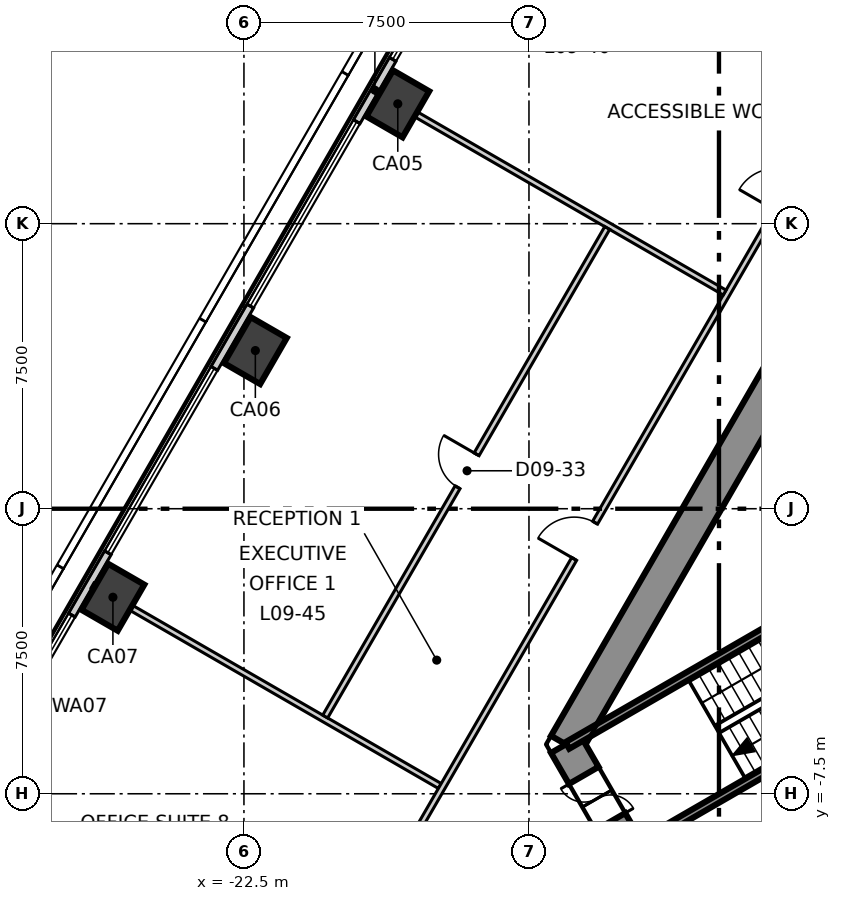
"""IFC4 building model, lengths in metres.
Left out: names, types, materials, properties, quantities, classifications, styles, units other than length and angle.
Written with IfcOpenShell. Run it as: python <this file> out.ifc"""

import sys

from ifc_helpers import new_model, si_unit, direction, frame, frame_2d, origin, origin_2d, place, context, subcontext, project, spatial, polyline, rectangle, outline, extrude, element, fill, save


model = new_model("IFC4")
c1 = context("Model", 3, precision=1e-05, world=origin(), true_north=direction((0.0, 1.0)))
c2 = subcontext(c1, "Body", "Model", "MODEL_VIEW")
j1 = project(units=[si_unit("LENGTHUNIT", "METRE"), si_unit("PLANEANGLEUNIT", "RADIAN")], contexts=[c1])
p1 = place(None, origin())
s1 = spatial("IfcSite", under=j1, at=p1, CompositionType="ELEMENT")
p2 = place(p1, origin())
s2 = spatial("IfcBuilding", under=s1, at=p2, CompositionType="ELEMENT")
p3 = place(p2, frame((0.0, 0.0, 47.3)))
s3 = spatial("IfcBuildingStorey", under=s2, at=p3, CompositionType="ELEMENT", Elevation=47.3)
p4 = place(p3, frame((-1.645, 15.25, -0.3), z_axis=(0.0, 0.0, 1.0), x_axis=(-0.500026485275, -0.866010111964, 0.0)))
e1 = element("IfcWall", 1, at=p4, inside=s3, PredefinedType="SHEAR", context=c2, shape_type="SweptSolid", body=[
    extrude(outline(polyline([(-0.26, -0.45), (1.685, -0.45), (3.63, -0.45), (5.576, -0.45), (7.521, -0.45), (9.466, -0.449), (11.411, -0.449), (13.357, -0.449), (15.302, -0.449), (17.247, -0.449), (19.192, -0.449), (21.138, -0.449), (23.083, -0.449), (25.028, -0.449), (24.509, 0.45), (22.644, 0.45), (20.778, 0.45), (18.913, 0.45), (17.048, 0.45), (15.182, 0.449), (13.317, 0.449), (11.452, 0.449), (9.587, 0.449), (7.721, 0.449), (5.856, 0.449), (3.991, 0.449), (2.125, 0.449), (0.26, 0.449), (-0.26, -0.45)])), origin(), (0.0, 0.0, 1.0), 4.0),
])
p5 = place(p4, frame((11.834, 0.0, 0.3)))
e2 = element("IfcOpeningElement", 2, at=p5, cuts=e1, PredefinedType="OPENING", context=c2, shape_type="SweptSolid", body=[
    extrude(rectangle(XDim=1.1, YDim=2.1, at=frame_2d((0.55, 1.05))), frame((0.0, 0.46, 0.0), z_axis=(0.0, -1.0, 0.0), x_axis=(1.0, 0.0, 0.0)), (0.0, 0.0, 1.0), 0.92),
])
p6 = place(p4, frame((6.671, 0.0, 0.3)))
e3 = element("IfcOpeningElement", 3, at=p6, cuts=e1, PredefinedType="OPENING", context=c2, shape_type="SweptSolid", body=[
    extrude(rectangle(XDim=1.0, YDim=2.1, at=frame_2d((0.5, 1.05))), frame((0.0, 0.46, 0.0), z_axis=(0.0, -1.0, 0.0), x_axis=(1.0, 0.0, 0.0)), (0.0, 0.0, 1.0), 0.92),
])
p7 = place(p3, frame((-14.03, -6.2, -0.3), z_axis=(0.0, 0.0, 1.0), x_axis=(0.500111984565, -0.865960739811, 0.0)))
e4 = element("IfcWall", 4, at=p7, inside=s3, PredefinedType="SHEAR", context=c2, shape_type="SweptSolid", body=[
    extrude(outline(polyline([(-0.26, -0.449), (1.646, -0.449), (3.551, -0.45), (3.032, 0.45), (1.646, 0.45), (0.26, 0.45), (-0.26, -0.449)])), origin(), (0.0, 0.0, 1.0), 4.0),
])
p8 = place(p7, frame((0.946, 0.0, 0.3)))
e5 = element("IfcOpeningElement", 5, at=p8, cuts=e4, PredefinedType="OPENING", context=c2, shape_type="SweptSolid", body=[
    extrude(rectangle(XDim=1.4, YDim=2.1, at=frame_2d((0.7, 1.05))), frame((0.0, 0.46, 0.0), z_axis=(0.0, -1.0, 0.0), x_axis=(1.0, 0.0, 0.0)), (0.0, 0.0, 1.0), 0.92),
])
for number, where, z_axis, x_axis in (
    (6, (-18.452, 10.654, -0.3), (0.0, 0.0, 1.0), (0.5, 0.866, 0.0)),
    (7, (-22.2, 4.162, -0.3), (0.0, 0.0, 1.0), (0.5, 0.866, 0.0)),
    (8, (-25.948, -2.329, -0.3), (0.0, 0.0, 1.0), (0.5, 0.866, 0.0)),
):
    element("IfcColumn", number, at=place(p3, frame(where, z_axis=z_axis, x_axis=x_axis)), inside=s3, PredefinedType="COLUMN", context=c2, shape_type="SweptSolid", body=[
        extrude(rectangle(XDim=1.4, YDim=1.1, at=origin_2d()), origin(), (0.0, 0.0, 1.0), 4.0),
    ])
p9 = place(p3, frame((-3.417, 38.096, 0.0), z_axis=(0.0, 0.0, 1.0), x_axis=(-0.500000412988, -0.866025165346, 0.0)))
e9 = element("IfcWall", 9, at=p9, inside=s3, PredefinedType="ELEMENTEDWALL", context=c2, shape_type="SweptSolid", body=[
    extrude(rectangle(XDim=62.548, YDim=0.2, at=frame_2d((31.274, 0.0))), origin(), (0.0, 0.0, 1.0), 3.7),
])
p10 = place(p9, frame((2.25, 0.0, 0.9)))
e10 = element("IfcOpeningElement", 10, at=p10, cuts=e9, PredefinedType="OPENING", context=c2, shape_type="SweptSolid", body=[
    extrude(rectangle(XDim=5.6, YDim=2.5, at=frame_2d((2.8, 1.25))), frame((0.0, 0.11, 0.0), z_axis=(0.0, -1.0, 0.0), x_axis=(1.0, 0.0, 0.0)), (0.0, 0.0, 1.0), 0.22),
])
p11 = place(p9, frame((9.745, 0.0, 0.9)))
e11 = element("IfcOpeningElement", 11, at=p11, cuts=e9, PredefinedType="OPENING", context=c2, shape_type="SweptSolid", body=[
    extrude(rectangle(XDim=5.6, YDim=2.5, at=frame_2d((2.8, 1.25))), frame((0.0, 0.11, 0.0), z_axis=(0.0, -1.0, 0.0), x_axis=(1.0, 0.0, 0.0)), (0.0, 0.0, 1.0), 0.22),
])
p12 = place(p9, frame((17.241, 0.0, 0.9)))
e12 = element("IfcOpeningElement", 12, at=p12, cuts=e9, PredefinedType="OPENING", context=c2, shape_type="SweptSolid", body=[
    extrude(rectangle(XDim=5.6, YDim=2.5, at=frame_2d((2.8, 1.25))), frame((0.0, 0.11, 0.0), z_axis=(0.0, -1.0, 0.0), x_axis=(1.0, 0.0, 0.0)), (0.0, 0.0, 1.0), 0.22),
])
p13 = place(p9, frame((24.736, 0.0, 0.9)))
e13 = element("IfcOpeningElement", 13, at=p13, cuts=e9, PredefinedType="OPENING", context=c2, shape_type="SweptSolid", body=[
    extrude(rectangle(XDim=5.6, YDim=2.5, at=frame_2d((2.8, 1.25))), frame((0.0, 0.11, 0.0), z_axis=(0.0, -1.0, 0.0), x_axis=(1.0, 0.0, 0.0)), (0.0, 0.0, 1.0), 0.22),
])
p14 = place(p9, frame((32.231, 0.0, 0.9)))
e14 = element("IfcOpeningElement", 14, at=p14, cuts=e9, PredefinedType="OPENING", context=c2, shape_type="SweptSolid", body=[
    extrude(rectangle(XDim=5.6, YDim=2.5, at=frame_2d((2.8, 1.25))), frame((0.0, 0.11, 0.0), z_axis=(0.0, -1.0, 0.0), x_axis=(1.0, 0.0, 0.0)), (0.0, 0.0, 1.0), 0.22),
])
p15 = place(p9, frame((39.727, 0.0, 0.9)))
e15 = element("IfcOpeningElement", 15, at=p15, cuts=e9, PredefinedType="OPENING", context=c2, shape_type="SweptSolid", body=[
    extrude(rectangle(XDim=5.6, YDim=2.5, at=frame_2d((2.8, 1.25))), frame((0.0, 0.11, 0.0), z_axis=(0.0, -1.0, 0.0), x_axis=(1.0, 0.0, 0.0)), (0.0, 0.0, 1.0), 0.22),
])
p16 = place(p9, frame((47.222, 0.0, 0.9)))
e16 = element("IfcOpeningElement", 16, at=p16, cuts=e9, PredefinedType="OPENING", context=c2, shape_type="SweptSolid", body=[
    extrude(rectangle(XDim=5.6, YDim=2.5, at=frame_2d((2.8, 1.25))), frame((0.0, 0.11, 0.0), z_axis=(0.0, -1.0, 0.0), x_axis=(1.0, 0.0, 0.0)), (0.0, 0.0, 1.0), 0.22),
])
p17 = place(p9, frame((54.717, 0.0, 0.9)))
e17 = element("IfcOpeningElement", 17, at=p17, cuts=e9, PredefinedType="OPENING", context=c2, shape_type="SweptSolid", body=[
    extrude(rectangle(XDim=5.6, YDim=2.5, at=frame_2d((2.8, 1.25))), frame((0.0, 0.11, 0.0), z_axis=(0.0, -1.0, 0.0), x_axis=(1.0, 0.0, 0.0)), (0.0, 0.0, 1.0), 0.22),
])
p18 = place(p3, frame((-26.485, -2.019, 0.0), z_axis=(0.0, 0.0, 1.0), x_axis=(0.866027613664, -0.499996172356, 0.0)))
e18 = element("IfcWall", 18, at=p18, inside=s3, PredefinedType="PARTITIONING", context=c2, shape_type="SweptSolid", body=[
    extrude(rectangle(XDim=10.552, YDim=0.15, at=frame_2d((5.276, 0.0))), origin(), (0.0, 0.0, 1.0), 3.7),
])
p19 = place(p3, frame((-19.497, -11.17, 0.0), z_axis=(0.0, 0.0, 1.0), x_axis=(0.499998854553, 0.866026065108, 0.0)))
e19 = element("IfcWall", 19, at=p19, inside=s3, PredefinedType="PARTITIONING", context=c2, shape_type="SweptSolid", body=[
    extrude(rectangle(XDim=38.994, YDim=0.15, at=frame_2d((19.497, 0.0))), origin(), (0.0, 0.0, 1.0), 3.7),
])
p20 = place(p19, frame((36.144, 0.0, 0.0)))
e20 = element("IfcOpeningElement", 20, at=p20, cuts=e19, PredefinedType="OPENING", context=c2, shape_type="SweptSolid", body=[
    extrude(rectangle(XDim=1.1, YDim=2.1, at=frame_2d((0.55, 1.05))), frame((0.0, 0.085, 0.0), z_axis=(0.0, -1.0, 0.0), x_axis=(1.0, 0.0, 0.0)), (0.0, 0.0, 1.0), 0.17),
])
p21 = place(p19, frame((21.963, 0.0, 0.0)))
e21 = element("IfcOpeningElement", 21, at=p21, cuts=e19, PredefinedType="OPENING", context=c2, shape_type="SweptSolid", body=[
    extrude(rectangle(XDim=1.1, YDim=2.1, at=frame_2d((0.55, 1.05))), frame((0.0, 0.085, 0.0), z_axis=(0.0, -1.0, 0.0), x_axis=(1.0, 0.0, 0.0)), (0.0, 0.0, 1.0), 0.17),
])
p22 = place(p19, frame((32.363, 0.0, 0.0)))
e22 = element("IfcOpeningElement", 22, at=p22, cuts=e19, PredefinedType="OPENING", context=c2, shape_type="SweptSolid", body=[
    extrude(rectangle(XDim=0.9, YDim=2.1, at=frame_2d((0.45, 1.05))), frame((0.0, 0.085, 0.0), z_axis=(0.0, -1.0, 0.0), x_axis=(1.0, 0.0, 0.0)), (0.0, 0.0, 1.0), 0.17),
])
p23 = place(p19, frame((29.163, 0.0, 0.0)))
e23 = element("IfcOpeningElement", 23, at=p23, cuts=e19, PredefinedType="OPENING", context=c2, shape_type="SweptSolid", body=[
    extrude(rectangle(XDim=0.9, YDim=2.1, at=frame_2d((0.45, 1.05))), frame((0.0, 0.085, 0.0), z_axis=(0.0, -1.0, 0.0), x_axis=(1.0, 0.0, 0.0)), (0.0, 0.0, 1.0), 0.17),
])
p24 = place(p19, frame((26.263, 0.0, 0.0)))
e24 = element("IfcOpeningElement", 24, at=p24, cuts=e19, PredefinedType="OPENING", context=c2, shape_type="SweptSolid", body=[
    extrude(rectangle(XDim=1.0, YDim=2.1, at=frame_2d((0.5, 1.05))), frame((0.0, 0.085, 0.0), z_axis=(0.0, -1.0, 0.0), x_axis=(1.0, 0.0, 0.0)), (0.0, 0.0, 1.0), 0.17),
])
p25 = place(p19, frame((11.373, 0.0, 0.0)))
e25 = element("IfcOpeningElement", 25, at=p25, cuts=e19, PredefinedType="OPENING", context=c2, shape_type="SweptSolid", body=[
    extrude(rectangle(XDim=1.1, YDim=2.1, at=frame_2d((0.55, 1.05))), frame((0.0, 0.085, 0.0), z_axis=(0.0, -1.0, 0.0), x_axis=(1.0, 0.0, 0.0)), (0.0, 0.0, 1.0), 0.17),
])
p26 = place(p19, frame((1.581, 0.0, 0.0)))
e26 = element("IfcOpeningElement", 26, at=p26, cuts=e19, PredefinedType="OPENING", context=c2, shape_type="SweptSolid", body=[
    extrude(rectangle(XDim=1.1, YDim=2.1, at=frame_2d((0.55, 1.05))), frame((0.0, 0.085, 0.0), z_axis=(0.0, -1.0, 0.0), x_axis=(1.0, 0.0, 0.0)), (0.0, 0.0, 1.0), 0.17),
])
p27 = place(p3, frame((-18.989, 10.964, 0.0), z_axis=(0.0, 0.0, 1.0), x_axis=(0.866011810196, -0.500023544047, 0.0)))
e27 = element("IfcWall", 27, at=p27, inside=s3, PredefinedType="PARTITIONING", context=c2, shape_type="SweptSolid", body=[
    extrude(rectangle(XDim=10.552, YDim=0.15, at=frame_2d((5.276, 0.0))), origin(), (0.0, 0.0, 1.0), 3.2),
])
p28 = place(p3, frame((-9.743, 12.774, 0.0), z_axis=(0.0, 0.0, 1.0), x_axis=(0.865973391227, -0.500090077572, 0.0)))
e28 = element("IfcWall", 28, at=p28, inside=s3, PredefinedType="PARTITIONING", context=c2, shape_type="SweptSolid", body=[
    extrude(rectangle(XDim=3.449, YDim=0.15, at=frame_2d((1.725, 0.0))), origin(), (0.0, 0.0, 1.0), 3.7),
])
p29 = place(p3, frame((-20.362, -5.468, 0.0), z_axis=(0.0, 0.0, 1.0), x_axis=(0.49999393442, 0.866028905721, 0.0)))
e29 = element("IfcWall", 29, at=p29, inside=s3, PredefinedType="PARTITIONING", context=c2, shape_type="SweptSolid", body=[
    extrude(rectangle(XDim=14.843, YDim=0.15, at=frame_2d((7.421, 0.0))), origin(), (0.0, 0.0, 1.0), 3.7),
])
p30 = place(p29, frame((6.967, 0.0, 0.0)))
e30 = element("IfcOpeningElement", 30, at=p30, cuts=e29, PredefinedType="OPENING", context=c2, shape_type="SweptSolid", body=[
    extrude(rectangle(XDim=1.0, YDim=2.1, at=frame_2d((0.5, 1.05))), frame((0.0, 0.085, 0.0), z_axis=(0.0, -1.0, 0.0), x_axis=(1.0, 0.0, 0.0)), (0.0, 0.0, 1.0), 0.17),
])
p31 = place(p3, frame((-13.99, -6.229, 0.0), z_axis=(0.0, 0.0, 1.0), x_axis=(0.866060059011, 0.499939970583, 0.0)))
e31 = element("IfcWall", 31, at=p31, inside=s3, PredefinedType="SOLIDWALL", context=c2, shape_type="SweptSolid", body=[
    extrude(rectangle(XDim=8.615, YDim=0.2, at=frame_2d((4.307, 0.0))), origin(), (0.0, 0.0, 1.0), 3.7),
])
p32 = place(p3, frame((-12.39, -9.001, 0.0), z_axis=(0.0, 0.0, 1.0), x_axis=(0.866010975815, 0.500024989144, 0.0)))
e32 = element("IfcWall", 32, at=p32, inside=s3, PredefinedType="SOLIDWALL", context=c2, shape_type="SweptSolid", body=[
    extrude(rectangle(XDim=8.615, YDim=0.2, at=frame_2d((4.308, 0.0))), origin(), (0.0, 0.0, 1.0), 3.7),
])
p33 = place(p13, origin())
e33 = element("IfcWindow", 33, at=p33, inside=s3, PartitioningType="SINGLE_PANEL", PredefinedType="WINDOW", context=c2, shape_type="SweptSolid", body=[
    extrude(rectangle(XDim=5.6, YDim=2.5, at=frame_2d((2.8, 1.25))), frame((0.0, 0.03, 0.0), z_axis=(0.0, -1.0, 0.0), x_axis=(1.0, 0.0, 0.0)), (0.0, 0.0, 1.0), 0.06),
])
fill(e13, e33)
p34 = place(p14, origin())
e34 = element("IfcWindow", 34, at=p34, inside=s3, PartitioningType="SINGLE_PANEL", PredefinedType="WINDOW", context=c2, shape_type="SweptSolid", body=[
    extrude(rectangle(XDim=5.6, YDim=2.5, at=frame_2d((2.8, 1.25))), frame((0.0, 0.03, 0.0), z_axis=(0.0, -1.0, 0.0), x_axis=(1.0, 0.0, 0.0)), (0.0, 0.0, 1.0), 0.06),
])
fill(e14, e34)
p35 = place(p15, origin())
e35 = element("IfcWindow", 35, at=p35, inside=s3, PartitioningType="SINGLE_PANEL", PredefinedType="WINDOW", context=c2, shape_type="SweptSolid", body=[
    extrude(rectangle(XDim=5.6, YDim=2.5, at=frame_2d((2.8, 1.25))), frame((0.0, 0.03, 0.0), z_axis=(0.0, -1.0, 0.0), x_axis=(1.0, 0.0, 0.0)), (0.0, 0.0, 1.0), 0.06),
])
fill(e15, e35)
p36 = place(p16, origin())
e36 = element("IfcWindow", 36, at=p36, inside=s3, PartitioningType="SINGLE_PANEL", PredefinedType="WINDOW", context=c2, shape_type="SweptSolid", body=[
    extrude(rectangle(XDim=5.6, YDim=2.5, at=frame_2d((2.8, 1.25))), frame((0.0, 0.03, 0.0), z_axis=(0.0, -1.0, 0.0), x_axis=(1.0, 0.0, 0.0)), (0.0, 0.0, 1.0), 0.06),
])
fill(e16, e36)
p37 = place(p25, origin())
e37 = element("IfcDoor", 37, at=p37, inside=s3, OperationType="SINGLE_SWING_RIGHT", PredefinedType="DOOR", context=c2, shape_type="SweptSolid", body=[
    extrude(rectangle(XDim=1.1, YDim=2.1, at=frame_2d((0.55, 1.05))), frame((0.0, 0.025, 0.0), z_axis=(0.0, -1.0, 0.0), x_axis=(1.0, 0.0, 0.0)), (0.0, 0.0, 1.0), 0.05),
])
fill(e25, e37)
p38 = place(p30, origin())
e38 = element("IfcDoor", 38, at=p38, inside=s3, OperationType="SINGLE_SWING_LEFT", PredefinedType="DOOR", context=c2, shape_type="SweptSolid", body=[
    extrude(rectangle(XDim=1.0, YDim=2.1, at=frame_2d((0.5, 1.05))), frame((0.0, 0.025, 0.0), z_axis=(0.0, -1.0, 0.0), x_axis=(1.0, 0.0, 0.0)), (0.0, 0.0, 1.0), 0.05),
])
fill(e30, e38)
p39 = place(p8, origin())
e39 = element("IfcDoor", 39, at=p39, inside=s3, OperationType="DOUBLE_DOOR_SINGLE_SWING", PredefinedType="DOOR", context=c2, shape_type="SweptSolid", body=[
    extrude(rectangle(XDim=1.4, YDim=2.1, at=frame_2d((0.7, 1.05))), frame((0.0, 0.025, 0.0), z_axis=(0.0, -1.0, 0.0), x_axis=(1.0, 0.0, 0.0)), (0.0, 0.0, 1.0), 0.05),
])
fill(e5, e39)
save(model, sys.argv[1])
